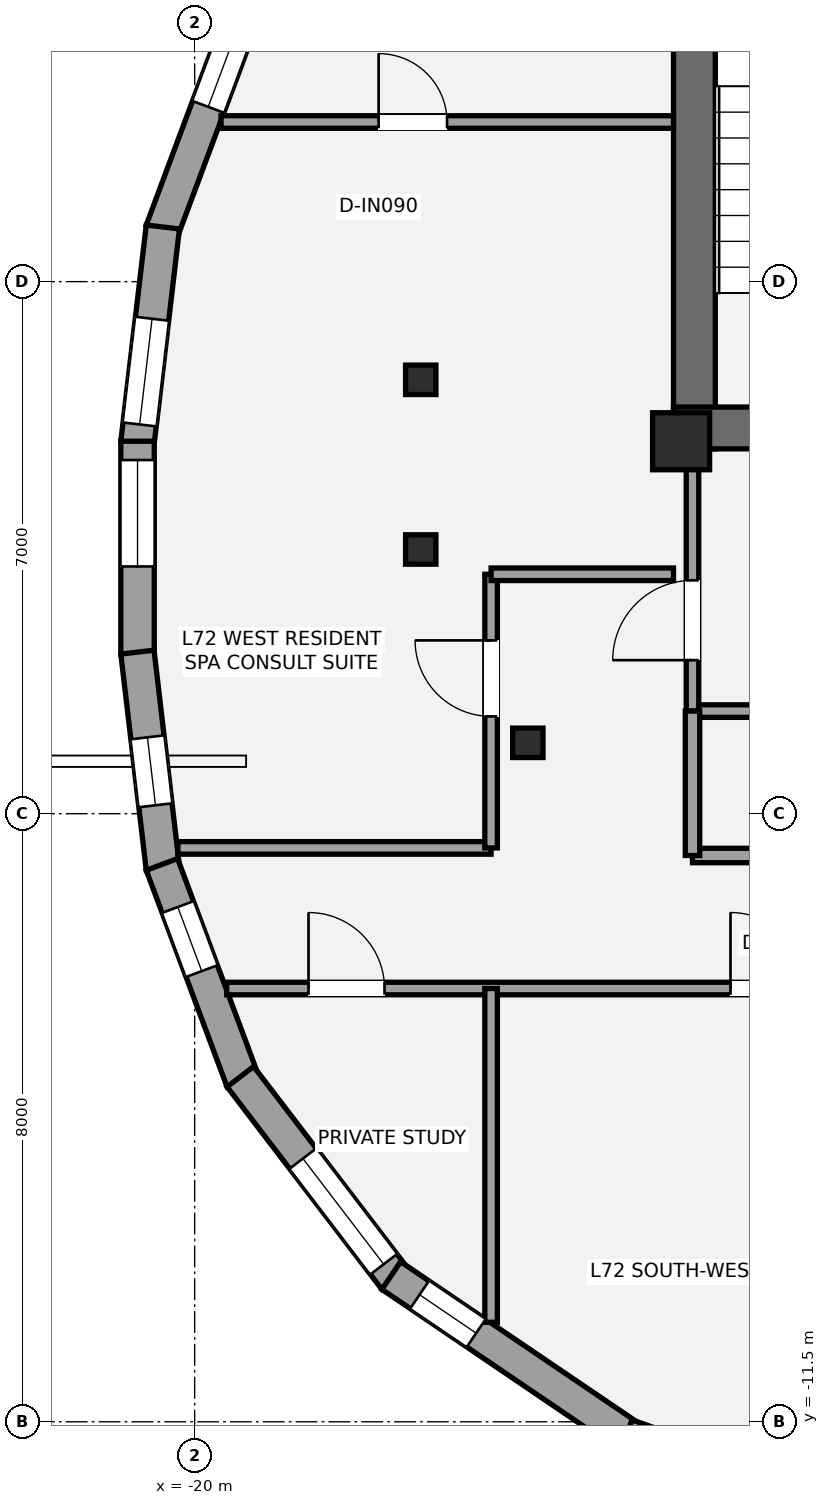
"""IFC4 building model, lengths in metres.
Left out: names, types, materials, properties, quantities, classifications, styles, units other than length and angle.
Written with IfcOpenShell. Run it as: python <this file> out.ifc"""

import sys

from ifc_helpers import new_model, si_unit, direction, frame, frame_2d, origin, origin_2d, place, context, subcontext, project, spatial, rectangle, i_section, extrude, element, fill, save


model = new_model("IFC4")
c1 = context("Model", 3, precision=1e-05, world=origin(), true_north=direction((0.0, 1.0)))
c2 = subcontext(c1, "Body", "Model", "MODEL_VIEW")
j1 = project(units=[si_unit("LENGTHUNIT", "METRE"), si_unit("PLANEANGLEUNIT", "RADIAN")], contexts=[c1])
p1 = place(None, origin())
s1 = spatial("IfcSite", under=j1, at=p1, CompositionType="ELEMENT")
p2 = place(p1, origin())
s2 = spatial("IfcBuilding", under=s1, at=p2, CompositionType="ELEMENT")
p3 = place(p2, frame((0.0, 0.0, 254.1)))
s3 = spatial("IfcBuildingStorey", under=s2, at=p3, CompositionType="ELEMENT", Elevation=254.1)
p4 = place(p3, frame((-13.425, 1.3, 0.0), z_axis=(0.0, 0.0, 1.0), x_axis=(0.0, 1.0, 0.0)))
e1 = element("IfcWall", 1, at=p4, inside=s3, PredefinedType="SHEAR", context=c2, shape_type="SweptSolid", body=[
    extrude(rectangle(XDim=8.25, YDim=0.55, at=frame_2d((4.125, 0.0))), origin(), (0.0, 0.0, 1.0), 3.15),
])
p5 = place(p3, frame((-4.925, 1.575, 0.0), z_axis=(0.0, 0.0, 1.0), x_axis=(-1.0, 0.0, 0.0)))
e2 = element("IfcWall", 2, at=p5, inside=s3, PredefinedType="SHEAR", context=c2, shape_type="SweptSolid", body=[
    extrude(rectangle(XDim=8.775, YDim=0.55, at=frame_2d((4.387, 0.0))), origin(), (0.0, 0.0, 1.0), 3.15),
])
p6 = place(p5, frame((5.375, 0.0, 0.0)))
e3 = element("IfcOpeningElement", 3, at=p6, cuts=e2, PredefinedType="OPENING", context=c2, shape_type="SweptSolid", body=[
    extrude(rectangle(XDim=1.05, YDim=2.15, at=frame_2d((0.525, 1.075))), frame((0.0, 0.285, 0.0), z_axis=(0.0, -1.0, 0.0), x_axis=(1.0, 0.0, 0.0)), (0.0, 0.0, 1.0), 0.57),
])
p7 = place(p5, frame((3.705, 0.0, 0.0)))
e4 = element("IfcOpeningElement", 4, at=p7, cuts=e2, PredefinedType="OPENING", context=c2, shape_type="SweptSolid", body=[
    extrude(rectangle(XDim=1.1, YDim=2.2, at=frame_2d((0.55, 1.1))), frame((0.0, 0.285, 0.0), z_axis=(0.0, -1.0, 0.0), x_axis=(1.0, 0.0, 0.0)), (0.0, 0.0, 1.0), 0.57),
])
p8 = place(p3, frame((-13.6, 1.4, 0.0), z_axis=(0.0, 0.0, 1.0), x_axis=(1.0, 0.0, 0.0)))
e5 = element("IfcColumn", 5, at=p8, inside=s3, PredefinedType="PILASTER", context=c2, shape_type="SweptSolid", body=[
    extrude(rectangle(XDim=0.75, YDim=0.75, at=origin_2d()), origin(), (0.0, 0.0, 1.0), 3.15),
])
for number, where, z_axis, x_axis in (
    (6, (-17.026, 2.208, 0.0), (0.0, 0.0, 1.0), (1.0, 0.0, 0.0)),
    (7, (-17.026, -0.024, 0.0), (0.0, 0.0, 1.0), (1.0, 0.0, 0.0)),
    (8, (-15.616, -2.567, 0.0), (0.0, 0.0, 1.0), (1.0, 0.0, 0.0)),
):
    element("IfcColumn", number, at=place(p3, frame(where, z_axis=z_axis, x_axis=x_axis)), inside=s3, PredefinedType="COLUMN", context=c2, shape_type="SweptSolid", body=[
        extrude(i_section(OverallWidth=0.399, OverallDepth=0.387, WebThickness=0.021, FlangeThickness=0.033, at=origin_2d()), origin(), (0.0, 0.0, 1.0), 3.15),
    ])
p9 = place(p3, frame((-20.431, 4.167, 0.0), z_axis=(0.0, 0.0, 1.0), x_axis=(0.349627332297, 0.936888856007, 0.0)))
e9 = element("IfcWall", 9, at=p9, inside=s3, PredefinedType="STANDARD", context=c2, shape_type="SweptSolid", body=[
    extrude(rectangle(XDim=3.041, YDim=0.44, at=frame_2d((1.521, 0.0))), origin(), (0.0, 0.0, 1.0), 2.336),
])
p10 = place(p9, frame((1.742, 0.0, 0.58)))
e10 = element("IfcOpeningElement", 10, at=p10, cuts=e9, PredefinedType="OPENING", context=c2, shape_type="SweptSolid", body=[
    extrude(rectangle(XDim=0.9, YDim=1.35, at=frame_2d((0.45, 0.675))), frame((0.0, 0.23, 0.0), z_axis=(0.0, -1.0, 0.0), x_axis=(1.0, 0.0, 0.0)), (0.0, 0.0, 1.0), 0.46),
])
p11 = place(p3, frame((-20.753, 1.375, 0.0), z_axis=(0.0, 0.0, 1.0), x_axis=(0.116885766715, 0.993145365764, 0.0)))
e11 = element("IfcWall", 11, at=p11, inside=s3, PredefinedType="STANDARD", context=c2, shape_type="SweptSolid", body=[
    extrude(rectangle(XDim=2.864, YDim=0.44, at=frame_2d((1.432, 0.0))), origin(), (0.0, 0.0, 1.0), 2.336),
])
p12 = place(p11, frame((0.248, 0.0, 0.58)))
e12 = element("IfcOpeningElement", 12, at=p12, cuts=e11, PredefinedType="OPENING", context=c2, shape_type="SweptSolid", body=[
    extrude(rectangle(XDim=1.4, YDim=1.55, at=frame_2d((0.7, 0.775))), frame((0.0, 0.23, 0.0), z_axis=(0.0, -1.0, 0.0), x_axis=(1.0, 0.0, 0.0)), (0.0, 0.0, 1.0), 0.46),
])
p13 = place(p3, frame((-20.752, -1.4, 0.0), z_axis=(0.0, 0.0, 1.0), x_axis=(0.0, 1.0, 0.0)))
e13 = element("IfcWall", 13, at=p13, inside=s3, PredefinedType="STANDARD", context=c2, shape_type="SweptSolid", body=[
    extrude(rectangle(XDim=2.801, YDim=0.44, at=frame_2d((1.4, 0.0))), origin(), (0.0, 0.0, 1.0), 2.336),
])
p14 = place(p13, frame((1.153, 0.0, 0.55)))
e14 = element("IfcOpeningElement", 14, at=p14, cuts=e13, PredefinedType="OPENING", context=c2, shape_type="SweptSolid", body=[
    extrude(rectangle(XDim=1.4, YDim=1.55, at=frame_2d((0.7, 0.775))), frame((0.0, 0.23, 0.0), z_axis=(0.0, -1.0, 0.0), x_axis=(1.0, 0.0, 0.0)), (0.0, 0.0, 1.0), 0.46),
])
p15 = place(p3, frame((-20.418, -4.219, 0.0), z_axis=(0.0, 0.0, 1.0), x_axis=(-0.116885766715, 0.993145365764, 0.0)))
e15 = element("IfcWall", 15, at=p15, inside=s3, PredefinedType="STANDARD", context=c2, shape_type="SweptSolid", body=[
    extrude(rectangle(XDim=2.864, YDim=0.44, at=frame_2d((1.432, 0.0))), origin(), (0.0, 0.0, 1.0), 2.336),
])
p16 = place(p15, frame((0.835, 0.0, 0.58)))
e16 = element("IfcOpeningElement", 16, at=p16, cuts=e15, PredefinedType="OPENING", context=c2, shape_type="SweptSolid", body=[
    extrude(rectangle(XDim=0.9, YDim=1.35, at=frame_2d((0.45, 0.675))), frame((0.0, 0.23, 0.0), z_axis=(0.0, -1.0, 0.0), x_axis=(1.0, 0.0, 0.0)), (0.0, 0.0, 1.0), 0.46),
])
p17 = place(p3, frame((-19.368, -7.017, 0.0), z_axis=(0.0, 0.0, 1.0), x_axis=(-0.349627332297, 0.936888856007, 0.0)))
e17 = element("IfcWall", 17, at=p17, inside=s3, PredefinedType="STANDARD", context=c2, shape_type="SweptSolid", body=[
    extrude(rectangle(XDim=3.041, YDim=0.44, at=frame_2d((1.521, 0.0))), origin(), (0.0, 0.0, 1.0), 2.336),
])
p18 = place(p17, frame((1.543, 0.0, 0.58)))
e18 = element("IfcOpeningElement", 18, at=p18, cuts=e17, PredefinedType="OPENING", context=c2, shape_type="SweptSolid", body=[
    extrude(rectangle(XDim=0.9, YDim=1.35, at=frame_2d((0.45, 0.675))), frame((0.0, 0.23, 0.0), z_axis=(0.0, -1.0, 0.0), x_axis=(1.0, 0.0, 0.0)), (0.0, 0.0, 1.0), 0.46),
])
p19 = place(p3, frame((-17.362, -9.625, 0.0), z_axis=(0.0, 0.0, 1.0), x_axis=(-0.607266352304, 0.794498318034, 0.0)))
e19 = element("IfcWall", 19, at=p19, inside=s3, PredefinedType="STANDARD", context=c2, shape_type="SweptSolid", body=[
    extrude(rectangle(XDim=3.354, YDim=0.44, at=frame_2d((1.677, 0.0))), origin(), (0.0, 0.0, 1.0), 2.336),
])
p20 = place(p19, frame((0.248, 0.0, 0.55)))
e20 = element("IfcOpeningElement", 20, at=p20, cuts=e19, PredefinedType="OPENING", context=c2, shape_type="SweptSolid", body=[
    extrude(rectangle(XDim=1.75, YDim=1.55, at=frame_2d((0.875, 0.775))), frame((0.0, 0.23, 0.0), z_axis=(0.0, -1.0, 0.0), x_axis=(1.0, 0.0, 0.0)), (0.0, 0.0, 1.0), 0.46),
])
p21 = place(p3, frame((-14.269, -11.708, 0.0), z_axis=(0.0, 0.0, 1.0), x_axis=(-0.827695346596, 0.561177702001, 0.0)))
e21 = element("IfcWall", 21, at=p21, inside=s3, PredefinedType="STANDARD", context=c2, shape_type="SweptSolid", body=[
    extrude(rectangle(XDim=3.8, YDim=0.44, at=frame_2d((1.9, 0.0))), origin(), (0.0, 0.0, 1.0), 2.336),
])
p22 = place(p21, frame((2.449, 0.0, 0.58)))
e22 = element("IfcOpeningElement", 22, at=p22, cuts=e21, PredefinedType="OPENING", context=c2, shape_type="SweptSolid", body=[
    extrude(rectangle(XDim=0.9, YDim=1.35, at=frame_2d((0.45, 0.675))), frame((0.0, 0.23, 0.0), z_axis=(0.0, -1.0, 0.0), x_axis=(1.0, 0.0, 0.0)), (0.0, 0.0, 1.0), 0.46),
])
p23 = place(p3, frame((-10.389, -13.063, 0.0), z_axis=(0.0, 0.0, 1.0), x_axis=(-0.943461130408, 0.331483175152, 0.0)))
e23 = element("IfcWall", 23, at=p23, inside=s3, PredefinedType="STANDARD", context=c2, shape_type="SweptSolid", body=[
    extrude(rectangle(XDim=4.166, YDim=0.44, at=frame_2d((2.083, 0.0))), origin(), (0.0, 0.0, 1.0), 2.336),
])
p24 = place(p23, frame((1.186, 0.0, 0.55)))
e24 = element("IfcOpeningElement", 24, at=p24, cuts=e23, PredefinedType="OPENING", context=c2, shape_type="SweptSolid", body=[
    extrude(rectangle(XDim=1.4, YDim=1.55, at=frame_2d((0.7, 0.775))), frame((0.0, 0.23, 0.0), z_axis=(0.0, -1.0, 0.0), x_axis=(1.0, 0.0, 0.0)), (0.0, 0.0, 1.0), 0.46),
])
p25 = place(p3, frame((-13.45, -2.15, 0.0), z_axis=(0.0, 0.0, 1.0), x_axis=(1.0, 0.0, 0.0)))
e25 = element("IfcWall", 25, at=p25, inside=s3, PredefinedType="PARTITIONING", context=c2, shape_type="SweptSolid", body=[
    extrude(rectangle(XDim=6.25, YDim=0.165, at=frame_2d((3.125, 0.0))), origin(), (0.0, 0.0, 1.0), 2.423),
])
p26 = place(p3, frame((-13.45, -2.15, 0.0), z_axis=(0.0, 0.0, 1.0), x_axis=(0.0, 1.0, 0.0)))
e26 = element("IfcWall", 26, at=p26, inside=s3, PredefinedType="PARTITIONING", context=c2, shape_type="SweptSolid", body=[
    extrude(rectangle(XDim=3.5, YDim=0.165, at=frame_2d((1.75, 0.0))), origin(), (0.0, 0.0, 1.0), 2.423),
])
p27 = place(p26, frame((0.67, 0.0, 0.0)))
e27 = element("IfcOpeningElement", 27, at=p27, cuts=e26, PredefinedType="OPENING", context=c2, shape_type="SweptSolid", body=[
    extrude(rectangle(XDim=1.05, YDim=2.15, at=frame_2d((0.525, 1.075))), frame((0.0, 0.093, 0.0), z_axis=(0.0, -1.0, 0.0), x_axis=(1.0, 0.0, 0.0)), (0.0, 0.0, 1.0), 0.185),
])
p28 = place(p3, frame((-13.45, -4.05, 0.0), z_axis=(0.0, 0.0, 1.0), x_axis=(1.0, 0.0, 0.0)))
e28 = element("IfcWall", 28, at=p28, inside=s3, PredefinedType="PLUMBINGWALL", context=c2, shape_type="SweptSolid", body=[
    extrude(rectangle(XDim=11.35, YDim=0.19, at=frame_2d((5.675, 0.0))), origin(), (0.0, 0.0, 1.0), 2.357),
])
p29 = place(p28, frame((1.25, 0.0, 0.0)))
e29 = element("IfcOpeningElement", 29, at=p29, cuts=e28, PredefinedType="OPENING", context=c2, shape_type="SweptSolid", body=[
    extrude(rectangle(XDim=0.95, YDim=2.15, at=frame_2d((0.475, 1.075))), frame((0.0, 0.105, 0.0), z_axis=(0.0, -1.0, 0.0), x_axis=(1.0, 0.0, 0.0)), (0.0, 0.0, 1.0), 0.21),
])
p30 = place(p28, frame((6.16, 0.0, 0.0)))
e30 = element("IfcOpeningElement", 30, at=p30, cuts=e28, PredefinedType="OPENING", context=c2, shape_type="SweptSolid", body=[
    extrude(rectangle(XDim=0.9, YDim=2.1, at=frame_2d((0.45, 1.05))), frame((0.0, 0.105, 0.0), z_axis=(0.0, -1.0, 0.0), x_axis=(1.0, 0.0, 0.0)), (0.0, 0.0, 1.0), 0.21),
])
p31 = place(p3, frame((-13.45, -4.05, 0.0), z_axis=(0.0, 0.0, 1.0), x_axis=(0.0, 1.0, 0.0)))
e31 = element("IfcWall", 31, at=p31, inside=s3, PredefinedType="PLUMBINGWALL", context=c2, shape_type="SweptSolid", body=[
    extrude(rectangle(XDim=1.9, YDim=0.19, at=frame_2d((0.95, 0.0))), origin(), (0.0, 0.0, 1.0), 2.423),
])
p32 = place(p3, frame((-19.578, -5.8, 0.0), z_axis=(0.0, 0.0, 1.0), x_axis=(1.0, 0.0, 0.0)))
e32 = element("IfcWall", 32, at=p32, inside=s3, PredefinedType="PARTITIONING", context=c2, shape_type="SweptSolid", body=[
    extrude(rectangle(XDim=39.157, YDim=0.165, at=frame_2d((19.578, 0.0))), origin(), (0.0, 0.0, 1.0), 2.423),
])
p33 = place(p32, frame((1.076, 0.0, 0.0)))
e33 = element("IfcOpeningElement", 33, at=p33, cuts=e32, PredefinedType="OPENING", context=c2, shape_type="SweptSolid", body=[
    extrude(rectangle(XDim=1.0, YDim=2.15, at=frame_2d((0.5, 1.075))), frame((0.0, 0.093, 0.0), z_axis=(0.0, -1.0, 0.0), x_axis=(1.0, 0.0, 0.0)), (0.0, 0.0, 1.0), 0.185),
])
p34 = place(p32, frame((37.32, 0.0, 0.0)))
e34 = element("IfcOpeningElement", 34, at=p34, cuts=e32, PredefinedType="OPENING", context=c2, shape_type="SweptSolid", body=[
    extrude(rectangle(XDim=1.0, YDim=2.15, at=frame_2d((0.5, 1.075))), frame((0.0, 0.093, 0.0), z_axis=(0.0, -1.0, 0.0), x_axis=(1.0, 0.0, 0.0)), (0.0, 0.0, 1.0), 0.185),
])
p35 = place(p32, frame((6.628, 0.0, 0.0)))
e35 = element("IfcOpeningElement", 35, at=p35, cuts=e32, PredefinedType="OPENING", context=c2, shape_type="SweptSolid", body=[
    extrude(rectangle(XDim=1.0, YDim=2.15, at=frame_2d((0.5, 1.075))), frame((0.0, 0.093, 0.0), z_axis=(0.0, -1.0, 0.0), x_axis=(1.0, 0.0, 0.0)), (0.0, 0.0, 1.0), 0.185),
])
p36 = place(p32, frame((13.858, 0.0, 0.0)))
e36 = element("IfcOpeningElement", 36, at=p36, cuts=e32, PredefinedType="OPENING", context=c2, shape_type="SweptSolid", body=[
    extrude(rectangle(XDim=1.0, YDim=2.15, at=frame_2d((0.5, 1.075))), frame((0.0, 0.093, 0.0), z_axis=(0.0, -1.0, 0.0), x_axis=(1.0, 0.0, 0.0)), (0.0, 0.0, 1.0), 0.185),
])
p37 = place(p32, frame((19.478, 0.0, 0.0)))
e37 = element("IfcOpeningElement", 37, at=p37, cuts=e32, PredefinedType="OPENING", context=c2, shape_type="SweptSolid", body=[
    extrude(rectangle(XDim=1.0, YDim=2.15, at=frame_2d((0.5, 1.075))), frame((0.0, 0.093, 0.0), z_axis=(0.0, -1.0, 0.0), x_axis=(1.0, 0.0, 0.0)), (0.0, 0.0, 1.0), 0.185),
])
p38 = place(p32, frame((26.098, 0.0, 0.0)))
e38 = element("IfcOpeningElement", 38, at=p38, cuts=e32, PredefinedType="OPENING", context=c2, shape_type="SweptSolid", body=[
    extrude(rectangle(XDim=1.0, YDim=2.15, at=frame_2d((0.5, 1.075))), frame((0.0, 0.093, 0.0), z_axis=(0.0, -1.0, 0.0), x_axis=(1.0, 0.0, 0.0)), (0.0, 0.0, 1.0), 0.185),
])
p39 = place(p32, frame((31.728, 0.0, 0.0)))
e39 = element("IfcOpeningElement", 39, at=p39, cuts=e32, PredefinedType="OPENING", context=c2, shape_type="SweptSolid", body=[
    extrude(rectangle(XDim=1.0, YDim=2.15, at=frame_2d((0.5, 1.075))), frame((0.0, 0.093, 0.0), z_axis=(0.0, -1.0, 0.0), x_axis=(1.0, 0.0, 0.0)), (0.0, 0.0, 1.0), 0.185),
])
p40 = place(p3, frame((-20.22, -3.95, 0.0), z_axis=(0.0, 0.0, 1.0), x_axis=(1.0, 0.0, 0.0)))
e40 = element("IfcWall", 40, at=p40, inside=s3, PredefinedType="PARTITIONING", context=c2, shape_type="SweptSolid", body=[
    extrude(rectangle(XDim=4.12, YDim=0.165, at=frame_2d((2.06, 0.0))), origin(), (0.0, 0.0, 1.0), 2.423),
])
p41 = place(p3, frame((-16.1, -3.95, 0.0), z_axis=(0.0, 0.0, 1.0), x_axis=(0.0, 1.0, 0.0)))
e41 = element("IfcWall", 41, at=p41, inside=s3, PredefinedType="PARTITIONING", context=c2, shape_type="SweptSolid", body=[
    extrude(rectangle(XDim=3.6, YDim=0.165, at=frame_2d((1.8, 0.0))), origin(), (0.0, 0.0, 1.0), 2.357),
])
p42 = place(p41, frame((1.73, 0.0, 0.0)))
e42 = element("IfcOpeningElement", 42, at=p42, cuts=e41, PredefinedType="OPENING", context=c2, shape_type="SweptSolid", body=[
    extrude(rectangle(XDim=1.0, YDim=2.15, at=frame_2d((0.5, 1.075))), frame((0.0, 0.093, 0.0), z_axis=(0.0, -1.0, 0.0), x_axis=(1.0, 0.0, 0.0)), (0.0, 0.0, 1.0), 0.185),
])
p43 = place(p3, frame((-16.1, -0.35, 0.0), z_axis=(0.0, 0.0, 1.0), x_axis=(1.0, 0.0, 0.0)))
e43 = element("IfcWall", 43, at=p43, inside=s3, PredefinedType="PARTITIONING", context=c2, shape_type="SweptSolid", body=[
    extrude(rectangle(XDim=2.4, YDim=0.165, at=frame_2d((1.2, 0.0))), origin(), (0.0, 0.0, 1.0), 2.423),
])
p44 = place(p3, frame((-19.653, 5.6, 0.0), z_axis=(0.0, 0.0, 1.0), x_axis=(1.0, 0.0, 0.0)))
e44 = element("IfcWall", 44, at=p44, inside=s3, PredefinedType="PARTITIONING", context=c2, shape_type="SweptSolid", body=[
    extrude(rectangle(XDim=5.953, YDim=0.165, at=frame_2d((2.977, 0.0))), origin(), (0.0, 0.0, 1.0), 2.97),
])
p45 = place(p44, frame((2.073, 0.0, 0.0)))
e45 = element("IfcOpeningElement", 45, at=p45, cuts=e44, PredefinedType="OPENING", context=c2, shape_type="SweptSolid", body=[
    extrude(rectangle(XDim=0.9, YDim=2.1, at=frame_2d((0.45, 1.05))), frame((0.0, 0.093, 0.0), z_axis=(0.0, -1.0, 0.0), x_axis=(1.0, 0.0, 0.0)), (0.0, 0.0, 1.0), 0.185),
])
p46 = place(p3, frame((-16.1, -10.191, 0.0), z_axis=(0.0, 0.0, 1.0), x_axis=(0.0, 1.0, 0.0)))
e46 = element("IfcWall", 46, at=p46, inside=s3, PredefinedType="PARTITIONING", context=c2, shape_type="SweptSolid", body=[
    extrude(rectangle(XDim=4.391, YDim=0.165, at=frame_2d((2.196, 0.0))), origin(), (0.0, 0.0, 1.0), 2.423),
])
p47 = place(p10, origin())
e47 = element("IfcWindow", 47, at=p47, inside=s3, PartitioningType="SINGLE_PANEL", PredefinedType="WINDOW", context=c2, shape_type="SweptSolid", body=[
    extrude(rectangle(XDim=0.9, YDim=1.35, at=frame_2d((0.45, 0.675))), frame((0.0, -0.01, 0.0), z_axis=(0.0, -1.0, 0.0), x_axis=(1.0, 0.0, 0.0)), (0.0, 0.0, 1.0), 0.06),
])
fill(e10, e47)
p48 = place(p12, origin())
e48 = element("IfcWindow", 48, at=p48, inside=s3, PartitioningType="SINGLE_PANEL", PredefinedType="WINDOW", context=c2, shape_type="SweptSolid", body=[
    extrude(rectangle(XDim=1.4, YDim=1.55, at=frame_2d((0.7, 0.775))), frame((0.0, -0.01, 0.0), z_axis=(0.0, -1.0, 0.0), x_axis=(1.0, 0.0, 0.0)), (0.0, 0.0, 1.0), 0.06),
])
fill(e12, e48)
p49 = place(p14, origin())
e49 = element("IfcWindow", 49, at=p49, inside=s3, PartitioningType="SINGLE_PANEL", PredefinedType="WINDOW", context=c2, shape_type="SweptSolid", body=[
    extrude(rectangle(XDim=1.4, YDim=1.55, at=frame_2d((0.7, 0.775))), frame((0.0, -0.01, 0.0), z_axis=(0.0, -1.0, 0.0), x_axis=(1.0, 0.0, 0.0)), (0.0, 0.0, 1.0), 0.06),
])
fill(e14, e49)
p50 = place(p16, origin())
e50 = element("IfcWindow", 50, at=p50, inside=s3, PartitioningType="SINGLE_PANEL", PredefinedType="WINDOW", context=c2, shape_type="SweptSolid", body=[
    extrude(rectangle(XDim=0.9, YDim=1.35, at=frame_2d((0.45, 0.675))), frame((0.0, -0.01, 0.0), z_axis=(0.0, -1.0, 0.0), x_axis=(1.0, 0.0, 0.0)), (0.0, 0.0, 1.0), 0.06),
])
fill(e16, e50)
p51 = place(p18, origin())
e51 = element("IfcWindow", 51, at=p51, inside=s3, PartitioningType="SINGLE_PANEL", PredefinedType="WINDOW", context=c2, shape_type="SweptSolid", body=[
    extrude(rectangle(XDim=0.9, YDim=1.35, at=frame_2d((0.45, 0.675))), frame((0.0, -0.01, 0.0), z_axis=(0.0, -1.0, 0.0), x_axis=(1.0, 0.0, 0.0)), (0.0, 0.0, 1.0), 0.06),
])
fill(e18, e51)
p52 = place(p20, origin())
e52 = element("IfcWindow", 52, at=p52, inside=s3, PartitioningType="SINGLE_PANEL", PredefinedType="WINDOW", context=c2, shape_type="SweptSolid", body=[
    extrude(rectangle(XDim=1.75, YDim=1.55, at=frame_2d((0.875, 0.775))), frame((0.0, -0.01, 0.0), z_axis=(0.0, -1.0, 0.0), x_axis=(1.0, 0.0, 0.0)), (0.0, 0.0, 1.0), 0.06),
])
fill(e20, e52)
p53 = place(p22, origin())
e53 = element("IfcWindow", 53, at=p53, inside=s3, PartitioningType="SINGLE_PANEL", PredefinedType="WINDOW", context=c2, shape_type="SweptSolid", body=[
    extrude(rectangle(XDim=0.9, YDim=1.35, at=frame_2d((0.45, 0.675))), frame((0.0, -0.01, 0.0), z_axis=(0.0, -1.0, 0.0), x_axis=(1.0, 0.0, 0.0)), (0.0, 0.0, 1.0), 0.06),
])
fill(e22, e53)
p54 = place(p27, origin())
e54 = element("IfcDoor", 54, at=p54, inside=s3, OperationType="SINGLE_SWING_LEFT", PredefinedType="DOOR", context=c2, shape_type="SweptSolid", body=[
    extrude(rectangle(XDim=1.05, YDim=2.15, at=frame_2d((0.525, 1.075))), frame((0.0, 0.025, 0.0), z_axis=(0.0, -1.0, 0.0), x_axis=(1.0, 0.0, 0.0)), (0.0, 0.0, 1.0), 0.05),
])
fill(e27, e54)
p55 = place(p33, origin())
e55 = element("IfcDoor", 55, at=p55, inside=s3, OperationType="SINGLE_SWING_LEFT", PredefinedType="DOOR", context=c2, shape_type="SweptSolid", body=[
    extrude(rectangle(XDim=1.0, YDim=2.15, at=frame_2d((0.5, 1.075))), frame((0.0, 0.025, 0.0), z_axis=(0.0, -1.0, 0.0), x_axis=(1.0, 0.0, 0.0)), (0.0, 0.0, 1.0), 0.05),
])
fill(e33, e55)
p56 = place(p35, origin())
e56 = element("IfcDoor", 56, at=p56, inside=s3, OperationType="SINGLE_SWING_LEFT", PredefinedType="DOOR", context=c2, shape_type="SweptSolid", body=[
    extrude(rectangle(XDim=1.0, YDim=2.15, at=frame_2d((0.5, 1.075))), frame((0.0, 0.025, 0.0), z_axis=(0.0, -1.0, 0.0), x_axis=(1.0, 0.0, 0.0)), (0.0, 0.0, 1.0), 0.05),
])
fill(e35, e56)
p57 = place(p42, origin())
e57 = element("IfcDoor", 57, at=p57, inside=s3, OperationType="SINGLE_SWING_RIGHT", PredefinedType="DOOR", context=c2, shape_type="SweptSolid", body=[
    extrude(rectangle(XDim=1.0, YDim=2.15, at=frame_2d((0.5, 1.075))), frame((0.0, 0.025, 0.0), z_axis=(0.0, -1.0, 0.0), x_axis=(1.0, 0.0, 0.0)), (0.0, 0.0, 1.0), 0.05),
])
fill(e42, e57)
p58 = place(p45, origin())
e58 = element("IfcDoor", 58, at=p58, inside=s3, OperationType="SINGLE_SWING_LEFT", PredefinedType="DOOR", context=c2, shape_type="SweptSolid", body=[
    extrude(rectangle(XDim=0.9, YDim=2.1, at=frame_2d((0.45, 1.05))), frame((0.0, 0.025, 0.0), z_axis=(0.0, -1.0, 0.0), x_axis=(1.0, 0.0, 0.0)), (0.0, 0.0, 1.0), 0.05),
])
fill(e45, e58)
save(model, sys.argv[1])
